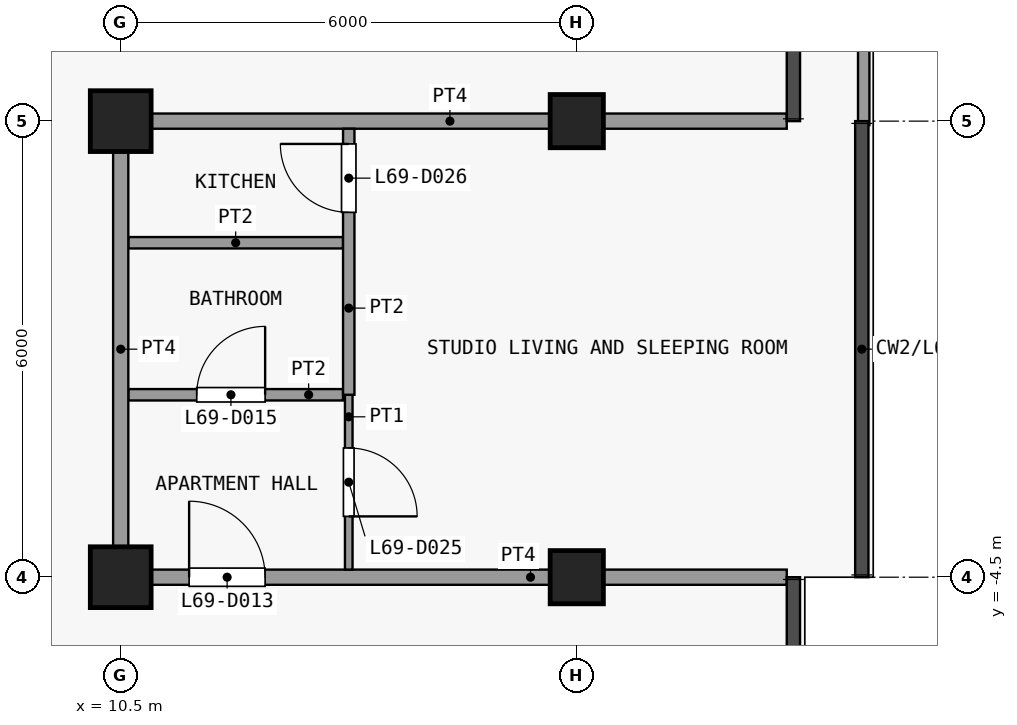
"""IFC4 building model, lengths in metres.
Left out: names, types, materials, properties, quantities, classifications, styles, units other than length and angle.
Written with IfcOpenShell. Run it as: python <this file> out.ifc"""

import sys

from ifc_helpers import new_model, si_unit, direction, frame, frame_2d, origin, origin_2d, place, context, subcontext, project, spatial, rectangle, extrude, element, fill, save


model = new_model("IFC4")
c1 = context("Model", 3, precision=1e-05, world=origin(), true_north=direction((0.0, 1.0)))
c2 = subcontext(c1, "Body", "Model", "MODEL_VIEW")
j1 = project(units=[si_unit("LENGTHUNIT", "METRE"), si_unit("PLANEANGLEUNIT", "RADIAN")], contexts=[c1])
p1 = place(None, origin())
s1 = spatial("IfcSite", under=j1, at=p1, CompositionType="ELEMENT")
p2 = place(p1, origin())
s2 = spatial("IfcBuilding", under=s1, at=p2, CompositionType="ELEMENT")
p3 = place(p2, frame((0.0, 0.0, 273.5)))
s3 = spatial("IfcBuildingStorey", under=s2, at=p3, CompositionType="ELEMENT", Elevation=273.5)
for number, where, z_axis, x_axis in (
    (1, (10.5, -4.5, 0.0), (0.0, 0.0, 1.0), (1.0, 0.0, 0.0)),
    (2, (10.5, 1.5, 0.0), (0.0, 0.0, 1.0), (1.0, 0.0, 0.0)),
):
    element("IfcColumn", number, at=place(p3, frame(where, z_axis=z_axis, x_axis=x_axis)), inside=s3, PredefinedType="COLUMN", context=c2, shape_type="SweptSolid", body=[
        extrude(rectangle(XDim=0.8, YDim=0.8, at=origin_2d()), origin(), (0.0, 0.0, 1.0), 3.6),
    ])
for number, where, z_axis, x_axis in (
    (3, (16.5, -4.5, 0.0), (0.0, 0.0, 1.0), (1.0, 0.0, 0.0)),
    (4, (16.5, 1.5, 0.0), (0.0, 0.0, 1.0), (1.0, 0.0, 0.0)),
):
    element("IfcColumn", number, at=place(p3, frame(where, z_axis=z_axis, x_axis=x_axis)), inside=s3, PredefinedType="COLUMN", context=c2, shape_type="SweptSolid", body=[
        extrude(rectangle(XDim=0.7, YDim=0.7, at=origin_2d()), origin(), (0.0, 0.0, 1.0), 3.6),
    ])
p4 = place(p3, frame((20.275, 7.3, 0.0), z_axis=(0.0, 0.0, 1.0), x_axis=(0.0, -1.0, 0.0)))
e5 = element("IfcWall", 5, at=p4, inside=s3, PredefinedType="PARAPET", context=c2, shape_type="SweptSolid", body=[
    extrude(rectangle(XDim=5.853, YDim=0.15, at=frame_2d((2.926, 0.0))), origin(), (0.0, 0.0, 1.0), 1.15),
])
p5 = place(p3, frame((10.4, -4.5, 0.0), z_axis=(0.0, 0.0, 1.0), x_axis=(1.0, 0.0, 0.0)))
e6 = element("IfcWall", 6, at=p5, inside=s3, PredefinedType="PARTITIONING", context=c2, shape_type="SweptSolid", body=[
    extrude(rectangle(XDim=8.863, YDim=0.2, at=frame_2d((4.431, 0.0))), origin(), (0.0, 0.0, 1.0), 3.3),
])
p6 = place(p5, frame((1.0, 0.0, 0.0)))
e7 = element("IfcOpeningElement", 7, at=p6, cuts=e6, PredefinedType="OPENING", context=c2, shape_type="SweptSolid", body=[
    extrude(rectangle(XDim=1.0, YDim=2.1, at=frame_2d((0.5, 1.05))), frame((0.0, 0.11, 0.0), z_axis=(0.0, -1.0, 0.0), x_axis=(1.0, 0.0, 0.0)), (0.0, 0.0, 1.0), 0.22),
])
p7 = place(p3, frame((10.6, -2.1, 0.0), z_axis=(0.0, 0.0, 1.0), x_axis=(1.0, 0.0, 0.0)))
e8 = element("IfcWall", 8, at=p7, inside=s3, PredefinedType="PARTITIONING", context=c2, shape_type="SweptSolid", body=[
    extrude(rectangle(XDim=2.825, YDim=0.15, at=frame_2d((1.413, 0.0))), origin(), (0.0, 0.0, 1.0), 3.3),
])
p8 = place(p7, frame((0.9, 0.0, 0.0)))
e9 = element("IfcOpeningElement", 9, at=p8, cuts=e8, PredefinedType="OPENING", context=c2, shape_type="SweptSolid", body=[
    extrude(rectangle(XDim=0.9, YDim=2.1, at=frame_2d((0.45, 1.05))), frame((0.0, 0.085, 0.0), z_axis=(0.0, -1.0, 0.0), x_axis=(1.0, 0.0, 0.0)), (0.0, 0.0, 1.0), 0.17),
])
p9 = place(p3, frame((10.6, -0.1, 0.0), z_axis=(0.0, 0.0, 1.0), x_axis=(1.0, 0.0, 0.0)))
e10 = element("IfcWall", 10, at=p9, inside=s3, PredefinedType="PARTITIONING", context=c2, shape_type="SweptSolid", body=[
    extrude(rectangle(XDim=2.825, YDim=0.15, at=frame_2d((1.413, 0.0))), origin(), (0.0, 0.0, 1.0), 3.3),
])
p10 = place(p3, frame((10.4, 1.5, 0.0), z_axis=(0.0, 0.0, 1.0), x_axis=(1.0, 0.0, 0.0)))
e11 = element("IfcWall", 11, at=p10, inside=s3, PredefinedType="PARTITIONING", context=c2, shape_type="SweptSolid", body=[
    extrude(rectangle(XDim=8.863, YDim=0.2, at=frame_2d((4.431, 0.0))), origin(), (0.0, 0.0, 1.0), 3.3),
])
p11 = place(p3, frame((10.5, -4.4, 0.0), z_axis=(0.0, 0.0, 1.0), x_axis=(0.0, 1.0, 0.0)))
e12 = element("IfcWall", 12, at=p11, inside=s3, PredefinedType="PARTITIONING", context=c2, shape_type="SweptSolid", body=[
    extrude(rectangle(XDim=5.8, YDim=0.2, at=frame_2d((2.9, 0.0))), origin(), (0.0, 0.0, 1.0), 3.3),
])
p12 = place(p3, frame((13.5, -4.4, 0.0), z_axis=(0.0, 0.0, 1.0), x_axis=(0.0, 1.0, 0.0)))
e13 = element("IfcWall", 13, at=p12, inside=s3, PredefinedType="PARTITIONING", context=c2, shape_type="SweptSolid", body=[
    extrude(rectangle(XDim=2.3, YDim=0.1, at=frame_2d((1.15, 0.0))), origin(), (0.0, 0.0, 1.0), 3.3),
])
p13 = place(p12, frame((0.7, 0.0, 0.0)))
e14 = element("IfcOpeningElement", 14, at=p13, cuts=e13, PredefinedType="OPENING", context=c2, shape_type="SweptSolid", body=[
    extrude(rectangle(XDim=0.9, YDim=2.1, at=frame_2d((0.45, 1.05))), frame((0.0, 0.06, 0.0), z_axis=(0.0, -1.0, 0.0), x_axis=(1.0, 0.0, 0.0)), (0.0, 0.0, 1.0), 0.12),
])
p14 = place(p3, frame((13.5, -2.1, 0.0), z_axis=(0.0, 0.0, 1.0), x_axis=(0.0, 1.0, 0.0)))
e15 = element("IfcWall", 15, at=p14, inside=s3, PredefinedType="PARTITIONING", context=c2, shape_type="SweptSolid", body=[
    extrude(rectangle(XDim=3.5, YDim=0.15, at=frame_2d((1.75, 0.0))), origin(), (0.0, 0.0, 1.0), 3.3),
])
p15 = place(p14, frame((2.4, 0.0, 0.0)))
e16 = element("IfcOpeningElement", 16, at=p15, cuts=e15, PredefinedType="OPENING", context=c2, shape_type="SweptSolid", body=[
    extrude(rectangle(XDim=0.9, YDim=2.1, at=frame_2d((0.45, 1.05))), frame((0.0, 0.085, 0.0), z_axis=(0.0, -1.0, 0.0), x_axis=(1.0, 0.0, 0.0)), (0.0, 0.0, 1.0), 0.17),
])
p16 = place(p6, origin())
e17 = element("IfcDoor", 17, at=p16, inside=s3, OperationType="SINGLE_SWING_RIGHT", PredefinedType="DOOR", context=c2, shape_type="SweptSolid", body=[
    extrude(rectangle(XDim=1.0, YDim=2.1, at=frame_2d((0.5, 1.05))), frame((0.0, 0.025, 0.0), z_axis=(0.0, -1.0, 0.0), x_axis=(1.0, 0.0, 0.0)), (0.0, 0.0, 1.0), 0.05),
])
fill(e7, e17)
p17 = place(p8, origin())
e18 = element("IfcDoor", 18, at=p17, inside=s3, OperationType="SINGLE_SWING_LEFT", PredefinedType="DOOR", context=c2, shape_type="SweptSolid", body=[
    extrude(rectangle(XDim=0.9, YDim=2.1, at=frame_2d((0.45, 1.05))), frame((0.0, 0.025, 0.0), z_axis=(0.0, -1.0, 0.0), x_axis=(1.0, 0.0, 0.0)), (0.0, 0.0, 1.0), 0.05),
])
fill(e9, e18)
p18 = place(p13, origin())
e19 = element("IfcDoor", 19, at=p18, inside=s3, OperationType="SINGLE_SWING_LEFT", PredefinedType="DOOR", context=c2, shape_type="SweptSolid", body=[
    extrude(rectangle(XDim=0.9, YDim=2.1, at=frame_2d((0.45, 1.05))), frame((0.0, 0.025, 0.0), z_axis=(0.0, -1.0, 0.0), x_axis=(1.0, 0.0, 0.0)), (0.0, 0.0, 1.0), 0.05),
])
fill(e14, e19)
p19 = place(p15, origin())
e20 = element("IfcDoor", 20, at=p19, inside=s3, OperationType="SINGLE_SWING_LEFT", PredefinedType="DOOR", context=c2, shape_type="SweptSolid", body=[
    extrude(rectangle(XDim=0.9, YDim=2.1, at=frame_2d((0.45, 1.05))), frame((0.0, 0.025, 0.0), z_axis=(0.0, -1.0, 0.0), x_axis=(1.0, 0.0, 0.0)), (0.0, 0.0, 1.0), 0.05),
])
fill(e16, e20)
save(model, sys.argv[1])
